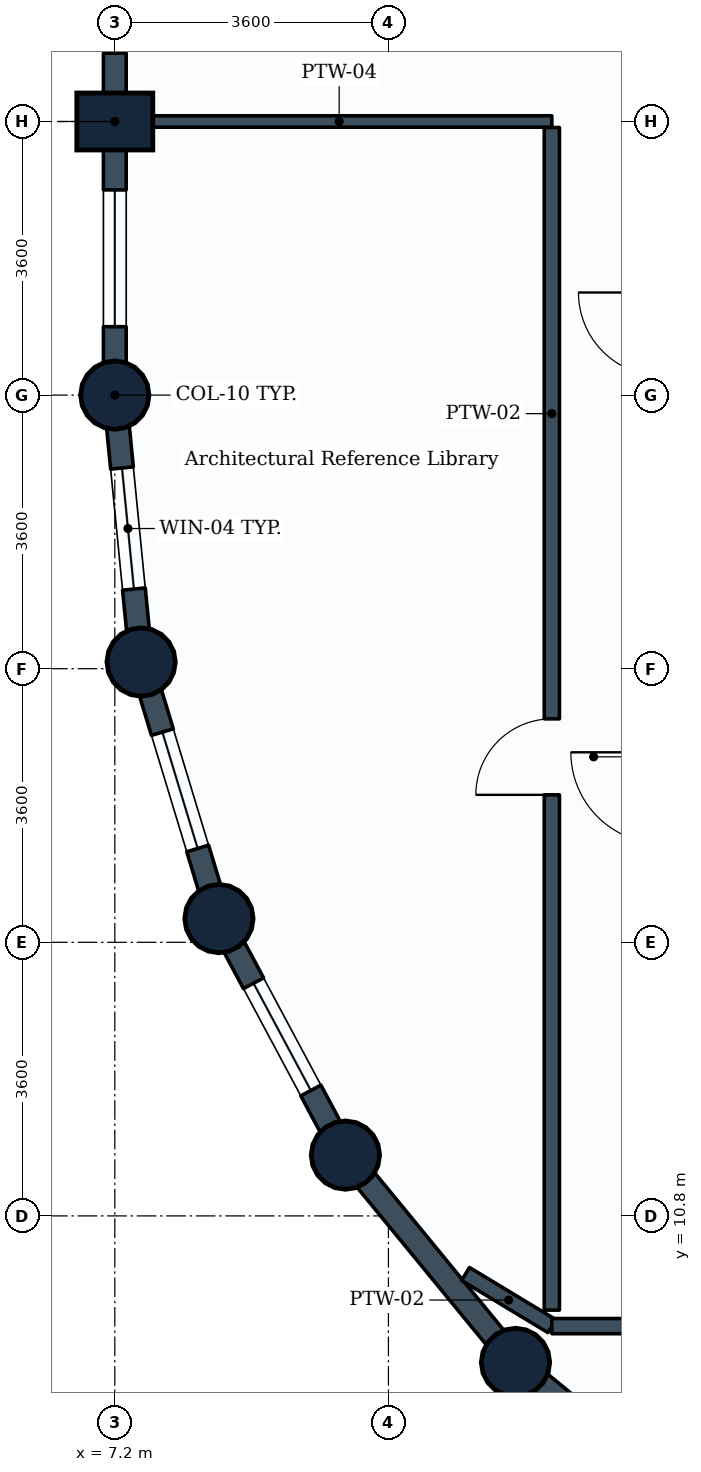
"""IFC4 building model, lengths in metres.
Left out: names, types, materials, properties, quantities, classifications, styles, units other than length and angle.
Written with IfcOpenShell. Run it as: python <this file> out.ifc"""

import sys

from ifc_helpers import new_model, si_unit, direction, frame, frame_2d, origin, origin_2d, place, context, subcontext, project, spatial, rectangle, circle, extrude, element, fill, save


model = new_model("IFC4")
c1 = context("Model", 3, precision=1e-05, world=origin(), true_north=direction((0.0, 1.0)))
c2 = subcontext(c1, "Body", "Model", "MODEL_VIEW")
j1 = project(units=[si_unit("LENGTHUNIT", "METRE"), si_unit("PLANEANGLEUNIT", "RADIAN")], contexts=[c1])
p1 = place(None, origin())
s1 = spatial("IfcSite", under=j1, at=p1, CompositionType="ELEMENT")
p2 = place(p1, origin())
s2 = spatial("IfcBuilding", under=s1, at=p2, CompositionType="ELEMENT")
p3 = place(p2, frame((0.0, 0.0, 127.6)))
s3 = spatial("IfcBuildingStorey", under=s2, at=p3, CompositionType="ELEMENT", Elevation=127.6)
p4 = place(p3, frame((7.2, 21.6, 0.0), z_axis=(0.0, 0.0, 1.0), x_axis=(1.0, 0.0, 0.0)))
e1 = element("IfcColumn", 1, at=p4, inside=s3, PredefinedType="COLUMN", context=c2, shape_type="SweptSolid", body=[
    extrude(circle(Radius=0.45, at=origin_2d()), origin(), (0.0, 0.0, 1.0), 3.8),
])
p5 = place(p3, frame((7.2, 25.2, 0.0), z_axis=(0.0, 0.0, 1.0), x_axis=(0.0, 1.0, 0.0)))
e2 = element("IfcColumn", 2, at=p5, inside=s3, PredefinedType="COLUMN", context=c2, shape_type="SweptSolid", body=[
    extrude(rectangle(XDim=0.75, YDim=1.0, at=origin_2d()), origin(), (0.0, 0.0, 1.0), 3.8),
])
for number, where, z_axis, x_axis in (
    (3, (7.546, 18.088, 0.0), (0.0, 0.0, 1.0), (1.0, 0.0, 0.0)),
    (4, (8.57, 14.712, 0.0), (0.0, 0.0, 1.0), (1.0, 0.0, 0.0)),
    (5, (10.234, 11.6, 0.0), (0.0, 0.0, 1.0), (1.0, 0.0, 0.0)),
    (6, (12.472, 8.872, 0.0), (0.0, 0.0, 1.0), (1.0, 0.0, 0.0)),
):
    element("IfcColumn", number, at=place(p3, frame(where, z_axis=z_axis, x_axis=x_axis)), inside=s3, PredefinedType="COLUMN", context=c2, shape_type="SweptSolid", body=[
        extrude(circle(Radius=0.45, at=origin_2d()), origin(), (0.0, 0.0, 1.0), 3.8),
    ])
p6 = place(p3, frame((7.2, 25.2, 0.0), z_axis=(0.0, 0.0, 1.0), x_axis=(0.0, 1.0, 0.0)))
e7 = element("IfcWall", 7, at=p6, inside=s3, PredefinedType="STANDARD", context=c2, shape_type="SweptSolid", body=[
    extrude(rectangle(XDim=3.6, YDim=0.3, at=frame_2d((1.8, 0.0))), origin(), (0.0, 0.0, 1.0), 2.93),
])
p7 = place(p6, frame((0.9, 0.0, 0.85)))
e8 = element("IfcOpeningElement", 8, at=p7, cuts=e7, PredefinedType="OPENING", context=c2, shape_type="SweptSolid", body=[
    extrude(rectangle(XDim=1.8, YDim=1.35, at=frame_2d((0.9, 0.675))), frame((0.0, 0.16, 0.0), z_axis=(0.0, -1.0, 0.0), x_axis=(1.0, 0.0, 0.0)), (0.0, 0.0, 1.0), 0.32),
])
p8 = place(p3, frame((7.2, 21.6, 0.0), z_axis=(0.0, 0.0, 1.0), x_axis=(0.0, 1.0, 0.0)))
e9 = element("IfcWall", 9, at=p8, inside=s3, PredefinedType="STANDARD", context=c2, shape_type="SweptSolid", body=[
    extrude(rectangle(XDim=3.6, YDim=0.3, at=frame_2d((1.8, 0.0))), origin(), (0.0, 0.0, 1.0), 2.93),
])
p9 = place(p8, frame((0.9, 0.0, 0.85)))
e10 = element("IfcOpeningElement", 10, at=p9, cuts=e9, PredefinedType="OPENING", context=c2, shape_type="SweptSolid", body=[
    extrude(rectangle(XDim=1.8, YDim=1.35, at=frame_2d((0.9, 0.675))), frame((0.0, 0.16, 0.0), z_axis=(0.0, -1.0, 0.0), x_axis=(1.0, 0.0, 0.0)), (0.0, 0.0, 1.0), 0.32),
])
p10 = place(p3, frame((7.546, 18.088, 0.0), z_axis=(0.0, 0.0, 1.0), x_axis=(-0.09802417461, 0.995184033831, 0.0)))
e11 = element("IfcWall", 11, at=p10, inside=s3, PredefinedType="STANDARD", context=c2, shape_type="SweptSolid", body=[
    extrude(rectangle(XDim=3.529, YDim=0.3, at=frame_2d((1.765, 0.0))), origin(), (0.0, 0.0, 1.0), 2.93),
])
p11 = place(p10, frame((0.965, 0.0, 0.85)))
e12 = element("IfcOpeningElement", 12, at=p11, cuts=e11, PredefinedType="OPENING", context=c2, shape_type="SweptSolid", body=[
    extrude(rectangle(XDim=1.6, YDim=1.35, at=frame_2d((0.8, 0.675))), frame((0.0, 0.16, 0.0), z_axis=(0.0, -1.0, 0.0), x_axis=(1.0, 0.0, 0.0)), (0.0, 0.0, 1.0), 0.32),
])
p12 = place(p3, frame((8.57, 14.712, 0.0), z_axis=(0.0, 0.0, 1.0), x_axis=(-0.290305086481, 0.956934144423, 0.0)))
e13 = element("IfcWall", 13, at=p12, inside=s3, PredefinedType="STANDARD", context=c2, shape_type="SweptSolid", body=[
    extrude(rectangle(XDim=3.528, YDim=0.3, at=frame_2d((1.764, 0.0))), origin(), (0.0, 0.0, 1.0), 2.93),
])
p13 = place(p12, frame((0.964, 0.0, 0.85)))
e14 = element("IfcOpeningElement", 14, at=p13, cuts=e13, PredefinedType="OPENING", context=c2, shape_type="SweptSolid", body=[
    extrude(rectangle(XDim=1.6, YDim=1.35, at=frame_2d((0.8, 0.675))), frame((0.0, 0.16, 0.0), z_axis=(0.0, -1.0, 0.0), x_axis=(1.0, 0.0, 0.0)), (0.0, 0.0, 1.0), 0.32),
])
p14 = place(p3, frame((10.234, 11.6, 0.0), z_axis=(0.0, 0.0, 1.0), x_axis=(-0.47151087309, 0.881860247748, 0.0)))
e15 = element("IfcWall", 15, at=p14, inside=s3, PredefinedType="STANDARD", context=c2, shape_type="SweptSolid", body=[
    extrude(rectangle(XDim=3.529, YDim=0.3, at=frame_2d((1.764, 0.0))), origin(), (0.0, 0.0, 1.0), 2.93),
])
p15 = place(p14, frame((0.964, 0.0, 0.85)))
e16 = element("IfcOpeningElement", 16, at=p15, cuts=e15, PredefinedType="OPENING", context=c2, shape_type="SweptSolid", body=[
    extrude(rectangle(XDim=1.6, YDim=1.35, at=frame_2d((0.8, 0.675))), frame((0.0, 0.16, 0.0), z_axis=(0.0, -1.0, 0.0), x_axis=(1.0, 0.0, 0.0)), (0.0, 0.0, 1.0), 0.32),
])
p16 = place(p3, frame((12.472, 8.872, 0.0), z_axis=(0.0, 0.0, 1.0), x_axis=(-0.634258295121, 0.773121216285, 0.0)))
e17 = element("IfcWall", 17, at=p16, inside=s3, PredefinedType="STANDARD", context=c2, shape_type="SweptSolid", body=[
    extrude(rectangle(XDim=3.529, YDim=0.3, at=frame_2d((1.764, 0.0))), origin(), (0.0, 0.0, 1.0), 2.93),
])
p17 = place(p3, frame((15.2, 6.634, 0.0), z_axis=(0.0, 0.0, 1.0), x_axis=(-0.773121216285, 0.634258295121, 0.0)))
e18 = element("IfcWall", 18, at=p17, inside=s3, PredefinedType="STANDARD", context=c2, shape_type="SweptSolid", body=[
    extrude(rectangle(XDim=3.529, YDim=0.3, at=frame_2d((1.764, 0.0))), origin(), (0.0, 0.0, 1.0), 2.93),
])
p18 = place(p17, frame((0.964, 0.0, 0.85)))
e19 = element("IfcOpeningElement", 19, at=p18, cuts=e18, PredefinedType="OPENING", context=c2, shape_type="SweptSolid", body=[
    extrude(rectangle(XDim=1.6, YDim=1.35, at=frame_2d((0.8, 0.675))), frame((0.0, 0.16, 0.0), z_axis=(0.0, -1.0, 0.0), x_axis=(1.0, 0.0, 0.0)), (0.0, 0.0, 1.0), 0.32),
])
p19 = place(p3, frame((7.354, 25.2, 0.0), z_axis=(0.0, 0.0, 1.0), x_axis=(1.0, 0.0, 0.0)))
e20 = element("IfcWall", 20, at=p19, inside=s3, PredefinedType="PARTITIONING", context=c2, shape_type="SweptSolid", body=[
    extrude(rectangle(XDim=5.596, YDim=0.15, at=frame_2d((2.798, 0.0))), origin(), (0.0, 0.0, 1.0), 3.535),
])
p20 = place(p3, frame((12.95, 9.35, 0.0), z_axis=(0.0, 0.0, 1.0), x_axis=(-0.856027557466, 0.516930189541, 0.0)))
e21 = element("IfcWall", 21, at=p20, inside=s3, PredefinedType="PARTITIONING", context=c2, shape_type="SweptSolid", body=[
    extrude(rectangle(XDim=1.326, YDim=0.2, at=frame_2d((0.663, 0.0))), origin(), (0.0, 0.0, 1.0), 2.93),
])
p21 = place(p3, frame((12.95, 9.56, 0.0), z_axis=(0.0, 0.0, 1.0), x_axis=(0.0, 1.0, 0.0)))
e22 = element("IfcWall", 22, at=p21, inside=s3, PredefinedType="PARTITIONING", context=c2, shape_type="SweptSolid", body=[
    extrude(rectangle(XDim=15.561, YDim=0.2, at=frame_2d((7.78, 0.0))), origin(), (0.0, 0.0, 1.0), 3.17),
])
p22 = place(p21, frame((6.78, 0.0, 0.0)))
e23 = element("IfcOpeningElement", 23, at=p22, cuts=e22, PredefinedType="OPENING", context=c2, shape_type="SweptSolid", body=[
    extrude(rectangle(XDim=1.0, YDim=2.1, at=frame_2d((0.5, 1.05))), frame((0.0, 0.11, 0.0), z_axis=(0.0, -1.0, 0.0), x_axis=(1.0, 0.0, 0.0)), (0.0, 0.0, 1.0), 0.22),
])
p23 = place(p3, frame((12.95, 9.35, 0.0), z_axis=(0.0, 0.0, 1.0), x_axis=(1.0, 0.0, 0.0)))
e24 = element("IfcWall", 24, at=p23, inside=s3, PredefinedType="PARTITIONING", context=c2, shape_type="SweptSolid", body=[
    extrude(rectangle(XDim=15.771, YDim=0.2, at=frame_2d((7.885, 0.0))), origin(), (0.0, 0.0, 1.0), 3.17),
])
p24 = place(p23, frame((4.836, 0.0, 0.0)))
e25 = element("IfcOpeningElement", 25, at=p24, cuts=e24, PredefinedType="OPENING", context=c2, shape_type="SweptSolid", body=[
    extrude(rectangle(XDim=1.0, YDim=2.1, at=frame_2d((0.5, 1.05))), frame((0.0, 0.11, 0.0), z_axis=(0.0, -1.0, 0.0), x_axis=(1.0, 0.0, 0.0)), (0.0, 0.0, 1.0), 0.22),
])
p25 = place(p7, origin())
e26 = element("IfcWindow", 26, at=p25, inside=s3, PartitioningType="SINGLE_PANEL", PredefinedType="WINDOW", context=c2, shape_type="SweptSolid", body=[
    extrude(rectangle(XDim=1.8, YDim=1.35, at=frame_2d((0.9, 0.675))), frame((0.0, 0.03, 0.0), z_axis=(0.0, -1.0, 0.0), x_axis=(1.0, 0.0, 0.0)), (0.0, 0.0, 1.0), 0.06),
])
fill(e8, e26)
p26 = place(p9, origin())
e27 = element("IfcWindow", 27, at=p26, inside=s3, PartitioningType="SINGLE_PANEL", PredefinedType="WINDOW", context=c2, shape_type="SweptSolid", body=[
    extrude(rectangle(XDim=1.8, YDim=1.35, at=frame_2d((0.9, 0.675))), frame((0.0, 0.03, 0.0), z_axis=(0.0, -1.0, 0.0), x_axis=(1.0, 0.0, 0.0)), (0.0, 0.0, 1.0), 0.06),
])
fill(e10, e27)
p27 = place(p11, origin())
e28 = element("IfcWindow", 28, at=p27, inside=s3, PartitioningType="SINGLE_PANEL", PredefinedType="WINDOW", context=c2, shape_type="SweptSolid", body=[
    extrude(rectangle(XDim=1.6, YDim=1.35, at=frame_2d((0.8, 0.675))), frame((0.0, 0.03, 0.0), z_axis=(0.0, -1.0, 0.0), x_axis=(1.0, 0.0, 0.0)), (0.0, 0.0, 1.0), 0.06),
])
fill(e12, e28)
p28 = place(p13, origin())
e29 = element("IfcWindow", 29, at=p28, inside=s3, PartitioningType="SINGLE_PANEL", PredefinedType="WINDOW", context=c2, shape_type="SweptSolid", body=[
    extrude(rectangle(XDim=1.6, YDim=1.35, at=frame_2d((0.8, 0.675))), frame((0.0, 0.03, 0.0), z_axis=(0.0, -1.0, 0.0), x_axis=(1.0, 0.0, 0.0)), (0.0, 0.0, 1.0), 0.06),
])
fill(e14, e29)
p29 = place(p15, origin())
e30 = element("IfcWindow", 30, at=p29, inside=s3, PartitioningType="SINGLE_PANEL", PredefinedType="WINDOW", context=c2, shape_type="SweptSolid", body=[
    extrude(rectangle(XDim=1.6, YDim=1.35, at=frame_2d((0.8, 0.675))), frame((0.0, 0.03, 0.0), z_axis=(0.0, -1.0, 0.0), x_axis=(1.0, 0.0, 0.0)), (0.0, 0.0, 1.0), 0.06),
])
fill(e16, e30)
p30 = place(p22, origin())
e31 = element("IfcDoor", 31, at=p30, inside=s3, OperationType="SINGLE_SWING_LEFT", PredefinedType="DOOR", context=c2, shape_type="SweptSolid", body=[
    extrude(rectangle(XDim=1.0, YDim=2.1, at=frame_2d((0.5, 1.05))), frame((0.0, 0.025, 0.0), z_axis=(0.0, -1.0, 0.0), x_axis=(1.0, 0.0, 0.0)), (0.0, 0.0, 1.0), 0.05),
])
fill(e23, e31)
save(model, sys.argv[1])
